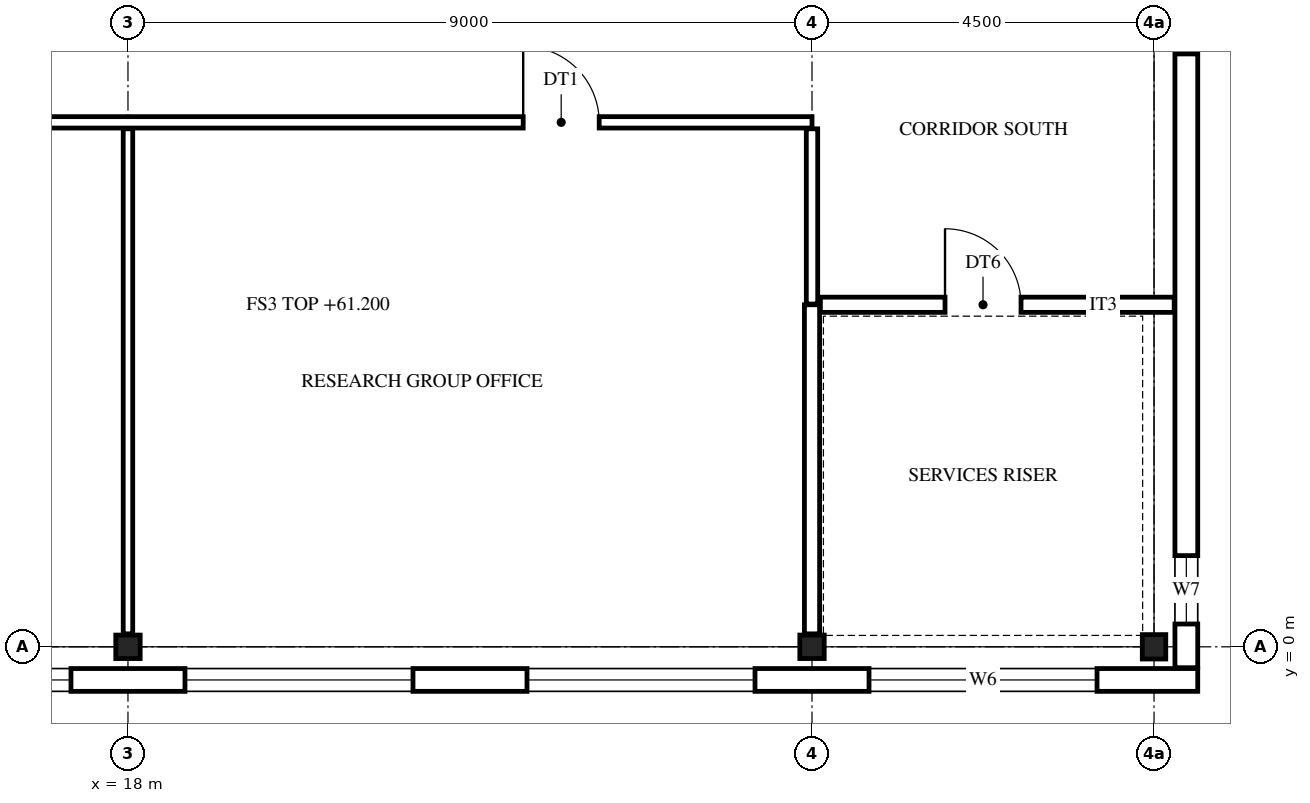
"""IFC4 building model, lengths in metres.
Left out: names, types, materials, properties, quantities, classifications, styles, units other than length and angle.
Written with IfcOpenShell. Run it as: python <this file> out.ifc"""

import sys

from ifc_helpers import new_model, si_unit, direction, frame, frame_2d, origin, origin_2d, place, context, subcontext, project, spatial, rectangle, i_section, extrude, element, fill, save


model = new_model("IFC4")
c1 = context("Model", 3, precision=1e-05, world=origin(), true_north=direction((0.0, 1.0)))
c2 = subcontext(c1, "Body", "Model", "MODEL_VIEW")
j1 = project(units=[si_unit("LENGTHUNIT", "METRE"), si_unit("PLANEANGLEUNIT", "RADIAN")], contexts=[c1])
p1 = place(None, origin())
s1 = spatial("IfcSite", under=j1, at=p1, CompositionType="ELEMENT")
p2 = place(p1, origin())
s2 = spatial("IfcBuilding", under=s1, at=p2, CompositionType="ELEMENT")
p3 = place(p2, frame((0.0, 0.0, 61.2)))
s3 = spatial("IfcBuildingStorey", under=s2, at=p3, CompositionType="ELEMENT", Elevation=61.2)
for number, where, z_axis, x_axis in (
    (1, (18.0, 0.0, 0.0), (0.0, 0.0, 1.0), (0.0, 1.0, 0.0)),
    (2, (27.0, 0.0, 0.0), (0.0, 0.0, 1.0), (0.0, 1.0, 0.0)),
    (3, (31.5, 0.0, 0.0), (0.0, 0.0, 1.0), (1.0, 0.0, 0.0)),
):
    element("IfcColumn", number, at=place(p3, frame(where, z_axis=z_axis, x_axis=x_axis)), inside=s3, PredefinedType="COLUMN", context=c2, shape_type="SweptSolid", body=[
        extrude(i_section(OverallWidth=0.309, OverallDepth=0.321, WebThickness=0.014, FlangeThickness=0.022, FilletRadius=0.017, at=origin_2d()), origin(), (0.0, 0.0, 1.0), 4.2),
    ])
p4 = place(p3, frame((32.075, -0.436, 0.0), z_axis=(0.0, 0.0, 1.0), x_axis=(-1.0, 0.0, 0.0)))
e4 = element("IfcWall", 4, at=p4, inside=s3, PredefinedType="STANDARD", context=c2, shape_type="SweptSolid", body=[
    extrude(rectangle(XDim=23.661, YDim=0.3, at=frame_2d((11.831, 0.0))), origin(), (0.0, 0.0, 1.0), 4.2),
])
p5 = place(p4, frame((19.325, 0.0, 0.6)))
e5 = element("IfcOpeningElement", 5, at=p5, cuts=e4, PredefinedType="OPENING", context=c2, shape_type="SweptSolid", body=[
    extrude(rectangle(XDim=3.0, YDim=2.8, at=frame_2d((1.5, 1.4))), frame((0.0, 0.16, 0.0), z_axis=(0.0, -1.0, 0.0), x_axis=(1.0, 0.0, 0.0)), (0.0, 0.0, 1.0), 0.32),
])
p6 = place(p4, frame((14.825, 0.0, 0.6)))
e6 = element("IfcOpeningElement", 6, at=p6, cuts=e4, PredefinedType="OPENING", context=c2, shape_type="SweptSolid", body=[
    extrude(rectangle(XDim=3.0, YDim=2.8, at=frame_2d((1.5, 1.4))), frame((0.0, 0.16, 0.0), z_axis=(0.0, -1.0, 0.0), x_axis=(1.0, 0.0, 0.0)), (0.0, 0.0, 1.0), 0.32),
])
p7 = place(p4, frame((10.325, 0.0, 0.6)))
e7 = element("IfcOpeningElement", 7, at=p7, cuts=e4, PredefinedType="OPENING", context=c2, shape_type="SweptSolid", body=[
    extrude(rectangle(XDim=3.0, YDim=2.8, at=frame_2d((1.5, 1.4))), frame((0.0, 0.16, 0.0), z_axis=(0.0, -1.0, 0.0), x_axis=(1.0, 0.0, 0.0)), (0.0, 0.0, 1.0), 0.32),
])
p8 = place(p4, frame((5.825, 0.0, 0.6)))
e8 = element("IfcOpeningElement", 8, at=p8, cuts=e4, PredefinedType="OPENING", context=c2, shape_type="SweptSolid", body=[
    extrude(rectangle(XDim=3.0, YDim=2.8, at=frame_2d((1.5, 1.4))), frame((0.0, 0.16, 0.0), z_axis=(0.0, -1.0, 0.0), x_axis=(1.0, 0.0, 0.0)), (0.0, 0.0, 1.0), 0.32),
])
p9 = place(p4, frame((1.325, 0.0, 0.6)))
e9 = element("IfcOpeningElement", 9, at=p9, cuts=e4, PredefinedType="OPENING", context=c2, shape_type="SweptSolid", body=[
    extrude(rectangle(XDim=3.0, YDim=2.8, at=frame_2d((1.5, 1.4))), frame((0.0, 0.16, 0.0), z_axis=(0.0, -1.0, 0.0), x_axis=(1.0, 0.0, 0.0)), (0.0, 0.0, 1.0), 0.32),
])
p10 = place(p3, frame((31.925, 27.275, 0.0), z_axis=(0.0, 0.0, 1.0), x_axis=(0.0, -1.0, 0.0)))
e10 = element("IfcWall", 10, at=p10, inside=s3, PredefinedType="STANDARD", context=c2, shape_type="SweptSolid", body=[
    extrude(rectangle(XDim=27.55, YDim=0.3, at=frame_2d((13.775, 0.0))), origin(), (0.0, 0.0, 1.0), 4.2),
])
p11 = place(p10, frame((26.075, 0.0, 0.6)))
e11 = element("IfcOpeningElement", 11, at=p11, cuts=e10, PredefinedType="OPENING", context=c2, shape_type="SweptSolid", body=[
    extrude(rectangle(XDim=0.9, YDim=2.3, at=frame_2d((0.45, 1.15))), frame((0.0, 0.16, 0.0), z_axis=(0.0, -1.0, 0.0), x_axis=(1.0, 0.0, 0.0)), (0.0, 0.0, 1.0), 0.32),
])
p12 = place(p10, frame((18.575, 0.0, 0.6)))
e12 = element("IfcOpeningElement", 12, at=p12, cuts=e10, PredefinedType="OPENING", context=c2, shape_type="SweptSolid", body=[
    extrude(rectangle(XDim=0.9, YDim=2.3, at=frame_2d((0.45, 1.15))), frame((0.0, 0.16, 0.0), z_axis=(0.0, -1.0, 0.0), x_axis=(1.0, 0.0, 0.0)), (0.0, 0.0, 1.0), 0.32),
])
p13 = place(p10, frame((15.725, 0.0, 1.6)))
e13 = element("IfcOpeningElement", 13, at=p13, cuts=e10, PredefinedType="OPENING", context=c2, shape_type="SweptSolid", body=[
    extrude(rectangle(XDim=0.6, YDim=0.9, at=frame_2d((0.3, 0.45))), frame((0.0, 0.16, 0.0), z_axis=(0.0, -1.0, 0.0), x_axis=(1.0, 0.0, 0.0)), (0.0, 0.0, 1.0), 0.32),
])
p14 = place(p10, frame((11.225, 0.0, 1.6)))
e14 = element("IfcOpeningElement", 14, at=p14, cuts=e10, PredefinedType="OPENING", context=c2, shape_type="SweptSolid", body=[
    extrude(rectangle(XDim=0.6, YDim=0.9, at=frame_2d((0.3, 0.45))), frame((0.0, 0.16, 0.0), z_axis=(0.0, -1.0, 0.0), x_axis=(1.0, 0.0, 0.0)), (0.0, 0.0, 1.0), 0.32),
])
p15 = place(p10, frame((8.075, 0.0, 0.6)))
e15 = element("IfcOpeningElement", 15, at=p15, cuts=e10, PredefinedType="OPENING", context=c2, shape_type="SweptSolid", body=[
    extrude(rectangle(XDim=0.9, YDim=2.3, at=frame_2d((0.45, 1.15))), frame((0.0, 0.16, 0.0), z_axis=(0.0, -1.0, 0.0), x_axis=(1.0, 0.0, 0.0)), (0.0, 0.0, 1.0), 0.32),
])
p16 = place(p10, frame((0.575, 0.0, 0.6)))
e16 = element("IfcOpeningElement", 16, at=p16, cuts=e10, PredefinedType="OPENING", context=c2, shape_type="SweptSolid", body=[
    extrude(rectangle(XDim=0.9, YDim=2.3, at=frame_2d((0.45, 1.15))), frame((0.0, 0.16, 0.0), z_axis=(0.0, -1.0, 0.0), x_axis=(1.0, 0.0, 0.0)), (0.0, 0.0, 1.0), 0.32),
])
p17 = place(p3, frame((18.0, 0.17, 0.0), z_axis=(0.0, 0.0, 1.0), x_axis=(0.0, 1.0, 0.0)))
e17 = element("IfcWall", 17, at=p17, inside=s3, PredefinedType="PARTITIONING", context=c2, shape_type="SweptSolid", body=[
    extrude(rectangle(XDim=6.645, YDim=0.125, at=frame_2d((3.322, 0.0))), origin(), (0.0, 0.0, 1.0), 3.537),
])
p18 = place(p3, frame((27.0, 0.17, 0.0), z_axis=(0.0, 0.0, 1.0), x_axis=(0.0, 1.0, 0.0)))
e18 = element("IfcWall", 18, at=p18, inside=s3, PredefinedType="PARTITIONING", context=c2, shape_type="SweptSolid", body=[
    extrude(rectangle(XDim=4.33, YDim=0.2, at=frame_2d((2.165, 0.0))), origin(), (0.0, 0.0, 1.0), 3.537),
])
p19 = place(p3, frame((27.0, 4.51, 0.0), z_axis=(0.0, 0.0, 1.0), x_axis=(0.0, 1.0, 0.0)))
e19 = element("IfcWall", 19, at=p19, inside=s3, PredefinedType="PARTITIONING", context=c2, shape_type="SweptSolid", body=[
    extrude(rectangle(XDim=2.305, YDim=0.15, at=frame_2d((1.152, 0.0))), origin(), (0.0, 0.0, 1.0), 3.537),
])
p20 = place(p3, frame((27.11, 4.5, 0.0), z_axis=(0.0, 0.0, 1.0), x_axis=(1.0, 0.0, 0.0)))
e20 = element("IfcWall", 20, at=p20, inside=s3, PredefinedType="PARTITIONING", context=c2, shape_type="SweptSolid", body=[
    extrude(rectangle(XDim=4.655, YDim=0.2, at=frame_2d((2.327, 0.0))), origin(), (0.0, 0.0, 1.0), 3.537),
])
p21 = place(p20, frame((1.64, 0.0, 0.0)))
e21 = element("IfcOpeningElement", 21, at=p21, cuts=e20, PredefinedType="OPENING", context=c2, shape_type="SweptSolid", body=[
    extrude(rectangle(XDim=1.0, YDim=2.1, at=frame_2d((0.5, 1.05))), frame((0.0, 0.11, 0.0), z_axis=(0.0, -1.0, 0.0), x_axis=(1.0, 0.0, 0.0)), (0.0, 0.0, 1.0), 0.22),
])
p22 = place(p3, frame((8.724, 6.9, 0.0), z_axis=(0.0, 0.0, 1.0), x_axis=(1.0, 0.0, 0.0)))
e22 = element("IfcWall", 22, at=p22, inside=s3, PredefinedType="PARTITIONING", context=c2, shape_type="SweptSolid", body=[
    extrude(rectangle(XDim=18.276, YDim=0.15, at=frame_2d((9.138, 0.0))), origin(), (0.0, 0.0, 1.0), 3.537),
])
p23 = place(p22, frame((4.276, 0.0, 0.0)))
e23 = element("IfcOpeningElement", 23, at=p23, cuts=e22, PredefinedType="OPENING", context=c2, shape_type="SweptSolid", body=[
    extrude(rectangle(XDim=1.0, YDim=2.1, at=frame_2d((0.5, 1.05))), frame((0.0, 0.085, 0.0), z_axis=(0.0, -1.0, 0.0), x_axis=(1.0, 0.0, 0.0)), (0.0, 0.0, 1.0), 0.17),
])
p24 = place(p22, frame((14.476, 0.0, 0.0)))
e24 = element("IfcOpeningElement", 24, at=p24, cuts=e22, PredefinedType="OPENING", context=c2, shape_type="SweptSolid", body=[
    extrude(rectangle(XDim=1.0, YDim=2.1, at=frame_2d((0.5, 1.05))), frame((0.0, 0.085, 0.0), z_axis=(0.0, -1.0, 0.0), x_axis=(1.0, 0.0, 0.0)), (0.0, 0.0, 1.0), 0.17),
])
p25 = place(p6, origin())
e25 = element("IfcWindow", 25, at=p25, inside=s3, PartitioningType="SINGLE_PANEL", PredefinedType="WINDOW", context=c2, shape_type="SweptSolid", body=[
    extrude(rectangle(XDim=3.0, YDim=2.8, at=frame_2d((1.5, 1.4))), frame((0.0, 0.03, 0.0), z_axis=(0.0, -1.0, 0.0), x_axis=(1.0, 0.0, 0.0)), (0.0, 0.0, 1.0), 0.06),
])
fill(e6, e25)
p26 = place(p7, origin())
e26 = element("IfcWindow", 26, at=p26, inside=s3, PartitioningType="SINGLE_PANEL", PredefinedType="WINDOW", context=c2, shape_type="SweptSolid", body=[
    extrude(rectangle(XDim=3.0, YDim=2.8, at=frame_2d((1.5, 1.4))), frame((0.0, 0.03, 0.0), z_axis=(0.0, -1.0, 0.0), x_axis=(1.0, 0.0, 0.0)), (0.0, 0.0, 1.0), 0.06),
])
fill(e7, e26)
p27 = place(p8, origin())
e27 = element("IfcWindow", 27, at=p27, inside=s3, PartitioningType="SINGLE_PANEL", PredefinedType="WINDOW", context=c2, shape_type="SweptSolid", body=[
    extrude(rectangle(XDim=3.0, YDim=2.8, at=frame_2d((1.5, 1.4))), frame((0.0, 0.03, 0.0), z_axis=(0.0, -1.0, 0.0), x_axis=(1.0, 0.0, 0.0)), (0.0, 0.0, 1.0), 0.06),
])
fill(e8, e27)
p28 = place(p9, origin())
e28 = element("IfcWindow", 28, at=p28, inside=s3, PartitioningType="SINGLE_PANEL", PredefinedType="WINDOW", context=c2, shape_type="SweptSolid", body=[
    extrude(rectangle(XDim=3.0, YDim=2.8, at=frame_2d((1.5, 1.4))), frame((0.0, 0.03, 0.0), z_axis=(0.0, -1.0, 0.0), x_axis=(1.0, 0.0, 0.0)), (0.0, 0.0, 1.0), 0.06),
])
fill(e9, e28)
p29 = place(p11, origin())
e29 = element("IfcWindow", 29, at=p29, inside=s3, PartitioningType="SINGLE_PANEL", PredefinedType="WINDOW", context=c2, shape_type="SweptSolid", body=[
    extrude(rectangle(XDim=0.9, YDim=2.3, at=frame_2d((0.45, 1.15))), frame((0.0, 0.03, 0.0), z_axis=(0.0, -1.0, 0.0), x_axis=(1.0, 0.0, 0.0)), (0.0, 0.0, 1.0), 0.06),
])
fill(e11, e29)
p30 = place(p12, origin())
e30 = element("IfcWindow", 30, at=p30, inside=s3, PartitioningType="SINGLE_PANEL", PredefinedType="WINDOW", context=c2, shape_type="SweptSolid", body=[
    extrude(rectangle(XDim=0.9, YDim=2.3, at=frame_2d((0.45, 1.15))), frame((0.0, 0.03, 0.0), z_axis=(0.0, -1.0, 0.0), x_axis=(1.0, 0.0, 0.0)), (0.0, 0.0, 1.0), 0.06),
])
fill(e12, e30)
p31 = place(p21, frame((1.0, 0.0, 0.0), z_axis=(0.0, 0.0, 1.0), x_axis=(-1.0, 0.0, 0.0)))
e31 = element("IfcDoor", 31, at=p31, inside=s3, OperationType="SINGLE_SWING_LEFT", PredefinedType="DOOR", context=c2, shape_type="SweptSolid", body=[
    extrude(rectangle(XDim=1.0, YDim=2.1, at=frame_2d((0.5, 1.05))), frame((0.0, 0.025, 0.0), z_axis=(0.0, -1.0, 0.0), x_axis=(1.0, 0.0, 0.0)), (0.0, 0.0, 1.0), 0.05),
])
fill(e21, e31)
p32 = place(p24, frame((1.0, 0.0, 0.0), z_axis=(0.0, 0.0, 1.0), x_axis=(-1.0, 0.0, 0.0)))
e32 = element("IfcDoor", 32, at=p32, inside=s3, OperationType="SINGLE_SWING_LEFT", PredefinedType="DOOR", context=c2, shape_type="SweptSolid", body=[
    extrude(rectangle(XDim=1.0, YDim=2.1, at=frame_2d((0.5, 1.05))), frame((0.0, 0.025, 0.0), z_axis=(0.0, -1.0, 0.0), x_axis=(1.0, 0.0, 0.0)), (0.0, 0.0, 1.0), 0.05),
])
fill(e24, e32)
save(model, sys.argv[1])
